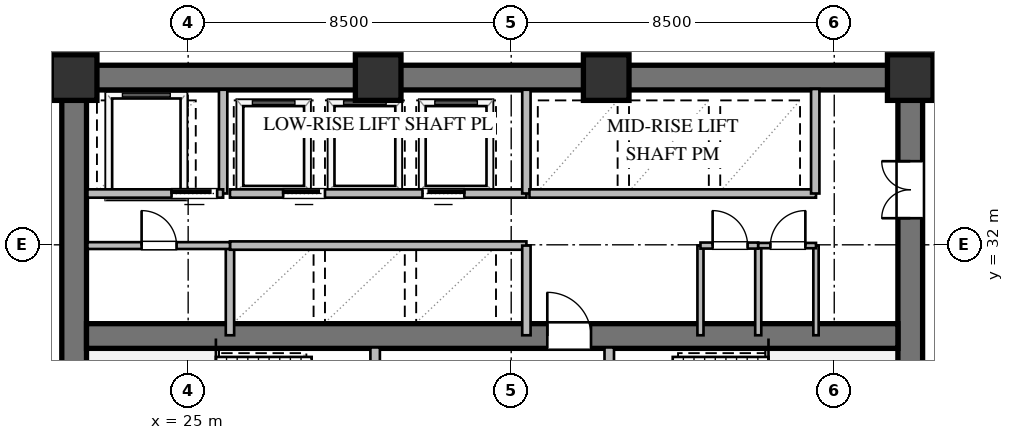
"""IFC4 building model, lengths in metres.
Left out: names, types, materials, properties, quantities, classifications, styles, units other than length and angle.
Written with IfcOpenShell. Run it as: python <this file> out.ifc"""

import sys

from ifc_helpers import new_model, si_unit, direction, frame, frame_2d, origin, origin_2d, place, context, subcontext, project, spatial, rectangle, extrude, element, fill, save


model = new_model("IFC4")
c1 = context("Model", 3, precision=1e-05, world=origin(), true_north=direction((0.0, 1.0)))
c2 = subcontext(c1, "Body", "Model", "MODEL_VIEW")
j1 = project(units=[si_unit("LENGTHUNIT", "METRE"), si_unit("PLANEANGLEUNIT", "RADIAN")], contexts=[c1])
p1 = place(None, origin())
s1 = spatial("IfcSite", under=j1, at=p1, CompositionType="ELEMENT")
p2 = place(p1, origin())
s2 = spatial("IfcBuilding", under=s1, at=p2, CompositionType="ELEMENT")
p3 = place(p2, frame((0.0, 0.0, 74.4)))
s3 = spatial("IfcBuildingStorey", under=s2, at=p3, CompositionType="ELEMENT", Elevation=74.4)
p4 = place(p3, frame((21.675, 36.4, 0.0), z_axis=(0.0, 0.0, 1.0), x_axis=(1.0, 0.0, 0.0)))
e1 = element("IfcWall", 1, at=p4, inside=s3, PredefinedType="SHEAR", context=c2, shape_type="SweptSolid", body=[
    extrude(rectangle(XDim=22.65, YDim=0.65, at=frame_2d((11.325, 0.0))), origin(), (0.0, 0.0, 1.0), 3.36),
])
p5 = place(p3, frame((22.0, 23.925, 0.0), z_axis=(0.0, 0.0, 1.0), x_axis=(0.0, 1.0, 0.0)))
e2 = element("IfcWall", 2, at=p5, inside=s3, PredefinedType="SHEAR", context=c2, shape_type="SweptSolid", body=[
    extrude(rectangle(XDim=12.15, YDim=0.65, at=frame_2d((6.075, 0.0))), origin(), (0.0, 0.0, 1.0), 3.36),
])
p6 = place(p3, frame((44.0, 23.925, 0.0), z_axis=(0.0, 0.0, 1.0), x_axis=(0.0, 1.0, 0.0)))
e3 = element("IfcWall", 3, at=p6, inside=s3, PredefinedType="SHEAR", context=c2, shape_type="SweptSolid", body=[
    extrude(rectangle(XDim=12.15, YDim=0.65, at=frame_2d((6.075, 0.0))), origin(), (0.0, 0.0, 1.0), 3.36),
])
p7 = place(p6, frame((8.775, 0.0, 0.0)))
e4 = element("IfcOpeningElement", 4, at=p7, cuts=e3, PredefinedType="OPENING", context=c2, shape_type="SweptSolid", body=[
    extrude(rectangle(XDim=1.5, YDim=2.15, at=frame_2d((0.75, 1.075))), frame((0.0, 0.335, 0.0), z_axis=(0.0, -1.0, 0.0), x_axis=(1.0, 0.0, 0.0)), (0.0, 0.0, 1.0), 0.67),
])
p8 = place(p3, frame((22.325, 29.6, 0.0), z_axis=(0.0, 0.0, 1.0), x_axis=(1.0, 0.0, 0.0)))
e5 = element("IfcWall", 5, at=p8, inside=s3, PredefinedType="SHEAR", context=c2, shape_type="SweptSolid", body=[
    extrude(rectangle(XDim=21.35, YDim=0.65, at=frame_2d((10.675, 0.0))), origin(), (0.0, 0.0, 1.0), 3.36),
])
p9 = place(p8, frame((12.125, 0.0, 0.0)))
e6 = element("IfcOpeningElement", 6, at=p9, cuts=e5, PredefinedType="OPENING", context=c2, shape_type="SweptSolid", body=[
    extrude(rectangle(XDim=1.15, YDim=2.1, at=frame_2d((0.575, 1.05))), frame((0.0, 0.335, 0.0), z_axis=(0.0, -1.0, 0.0), x_axis=(1.0, 0.0, 0.0)), (0.0, 0.0, 1.0), 0.67),
])
for number, where, z_axis, x_axis in (
    (7, (44.0, 36.4, 0.0), (0.0, 0.0, 1.0), (1.0, 0.0, 0.0)),
    (8, (36.0, 36.4, 0.0), (0.0, 0.0, 1.0), (1.0, 0.0, 0.0)),
    (9, (30.0, 36.4, 0.0), (0.0, 0.0, 1.0), (1.0, 0.0, 0.0)),
    (10, (22.0, 36.4, 0.0), (0.0, 0.0, 1.0), (1.0, 0.0, 0.0)),
):
    element("IfcColumn", number, at=place(p3, frame(where, z_axis=z_axis, x_axis=x_axis)), inside=s3, PredefinedType="COLUMN", context=c2, shape_type="SweptSolid", body=[
        extrude(rectangle(XDim=1.2, YDim=1.2, at=origin_2d()), origin(), (0.0, 0.0, 1.0), 3.6),
    ])
p10 = place(p3, frame((29.92, 23.9, 0.0), z_axis=(0.0, 0.0, 1.0), x_axis=(0.0, 1.0, 0.0)))
e11 = element("IfcWall", 11, at=p10, inside=s3, PredefinedType="SOLIDWALL", context=c2, shape_type="SweptSolid", body=[
    extrude(rectangle(XDim=5.4, YDim=0.25, at=frame_2d((2.7, 0.0))), origin(), (0.0, 0.0, 1.0), 3.36),
])
p11 = place(p10, frame((3.421, 0.0, 0.0)))
e12 = element("IfcOpeningElement", 12, at=p11, cuts=e11, PredefinedType="OPENING", context=c2, shape_type="SweptSolid", body=[
    extrude(rectangle(XDim=1.15, YDim=2.1, at=frame_2d((0.575, 1.05))), frame((0.0, 0.135, 0.0), z_axis=(0.0, -1.0, 0.0), x_axis=(1.0, 0.0, 0.0)), (0.0, 0.0, 1.0), 0.27),
])
p12 = place(p3, frame((36.08, 23.9, 0.0), z_axis=(0.0, 0.0, 1.0), x_axis=(0.0, 1.0, 0.0)))
e13 = element("IfcWall", 13, at=p12, inside=s3, PredefinedType="SOLIDWALL", context=c2, shape_type="SweptSolid", body=[
    extrude(rectangle(XDim=5.4, YDim=0.25, at=frame_2d((2.7, 0.0))), origin(), (0.0, 0.0, 1.0), 3.36),
])
p13 = place(p12, frame((3.421, 0.0, 0.0)))
e14 = element("IfcOpeningElement", 14, at=p13, cuts=e13, PredefinedType="OPENING", context=c2, shape_type="SweptSolid", body=[
    extrude(rectangle(XDim=1.15, YDim=2.1, at=frame_2d((0.575, 1.05))), frame((0.0, 0.135, 0.0), z_axis=(0.0, -1.0, 0.0), x_axis=(1.0, 0.0, 0.0)), (0.0, 0.0, 1.0), 0.27),
])
p14 = place(p3, frame((25.92, 33.35, 0.0), z_axis=(0.0, 0.0, 1.0), x_axis=(0.0, 1.0, 0.0)))
e15 = element("IfcWall", 15, at=p14, inside=s3, PredefinedType="SOLIDWALL", context=c2, shape_type="SweptSolid", body=[
    extrude(rectangle(XDim=2.73, YDim=0.22, at=frame_2d((1.365, 0.0))), origin(), (0.0, 0.0, 1.0), 3.36),
])
p15 = place(p3, frame((22.35, 33.35, 0.0), z_axis=(0.0, 0.0, 1.0), x_axis=(1.0, 0.0, 0.0)))
e16 = element("IfcWall", 16, at=p15, inside=s3, PredefinedType="SOLIDWALL", context=c2, shape_type="SweptSolid", body=[
    extrude(rectangle(XDim=3.57, YDim=0.22, at=frame_2d((1.785, 0.0))), origin(), (0.0, 0.0, 1.0), 3.36),
])
p16 = place(p15, frame((2.213, 0.0, 0.0)))
e17 = element("IfcOpeningElement", 17, at=p16, cuts=e16, PredefinedType="OPENING", context=c2, shape_type="SweptSolid", body=[
    extrude(rectangle(XDim=1.2, YDim=2.1, at=frame_2d((0.6, 1.05))), frame((0.0, 0.12, 0.0), z_axis=(0.0, -1.0, 0.0), x_axis=(1.0, 0.0, 0.0)), (0.0, 0.0, 1.0), 0.24),
])
p17 = place(p3, frame((26.1, 29.62, 0.0), z_axis=(0.0, 0.0, 1.0), x_axis=(0.0, 1.0, 0.0)))
e18 = element("IfcWall", 18, at=p17, inside=s3, PredefinedType="SOLIDWALL", context=c2, shape_type="SweptSolid", body=[
    extrude(rectangle(XDim=2.36, YDim=0.22, at=frame_2d((1.18, 0.0))), origin(), (0.0, 0.0, 1.0), 3.36),
])
p18 = place(p3, frame((26.1, 31.98, 0.0), z_axis=(0.0, 0.0, 1.0), x_axis=(1.0, 0.0, 0.0)))
e19 = element("IfcWall", 19, at=p18, inside=s3, PredefinedType="SOLIDWALL", context=c2, shape_type="SweptSolid", body=[
    extrude(rectangle(XDim=7.8, YDim=0.22, at=frame_2d((3.9, 0.0))), origin(), (0.0, 0.0, 1.0), 3.36),
])
p19 = place(p3, frame((33.9, 29.62, 0.0), z_axis=(0.0, 0.0, 1.0), x_axis=(0.0, 1.0, 0.0)))
e20 = element("IfcWall", 20, at=p19, inside=s3, PredefinedType="SOLIDWALL", context=c2, shape_type="SweptSolid", body=[
    extrude(rectangle(XDim=2.36, YDim=0.22, at=frame_2d((1.18, 0.0))), origin(), (0.0, 0.0, 1.0), 3.36),
])
p20 = place(p3, frame((26.1, 33.35, 0.0), z_axis=(0.0, 0.0, 1.0), x_axis=(1.0, 0.0, 0.0)))
e21 = element("IfcWall", 21, at=p20, inside=s3, PredefinedType="SOLIDWALL", context=c2, shape_type="SweptSolid", body=[
    extrude(rectangle(XDim=7.8, YDim=0.22, at=frame_2d((3.9, 0.0))), origin(), (0.0, 0.0, 1.0), 3.36),
])
p21 = place(p20, frame((1.4, 0.0, 0.0)))
e22 = element("IfcOpeningElement", 22, at=p21, cuts=e21, PredefinedType="OPENING", context=c2, shape_type="SweptSolid", body=[
    extrude(rectangle(XDim=1.1, YDim=2.1, at=frame_2d((0.55, 1.05))), frame((0.0, 0.12, 0.0), z_axis=(0.0, -1.0, 0.0), x_axis=(1.0, 0.0, 0.0)), (0.0, 0.0, 1.0), 0.24),
])
p22 = place(p20, frame((5.066, 0.0, 0.0)))
e23 = element("IfcOpeningElement", 23, at=p22, cuts=e21, PredefinedType="OPENING", context=c2, shape_type="SweptSolid", body=[
    extrude(rectangle(XDim=1.1, YDim=2.1, at=frame_2d((0.55, 1.05))), frame((0.0, 0.12, 0.0), z_axis=(0.0, -1.0, 0.0), x_axis=(1.0, 0.0, 0.0)), (0.0, 0.0, 1.0), 0.24),
])
p23 = place(p3, frame((33.9, 33.35, 0.0), z_axis=(0.0, 0.0, 1.0), x_axis=(0.0, 1.0, 0.0)))
e24 = element("IfcWall", 24, at=p23, inside=s3, PredefinedType="SOLIDWALL", context=c2, shape_type="SweptSolid", body=[
    extrude(rectangle(XDim=2.73, YDim=0.22, at=frame_2d((1.365, 0.0))), origin(), (0.0, 0.0, 1.0), 3.36),
])
p24 = place(p3, frame((33.98, 33.35, 0.0), z_axis=(0.0, 0.0, 1.0), x_axis=(1.0, 0.0, 0.0)))
e25 = element("IfcWall", 25, at=p24, inside=s3, PredefinedType="SOLIDWALL", context=c2, shape_type="SweptSolid", body=[
    extrude(rectangle(XDim=7.54, YDim=0.22, at=frame_2d((3.77, 0.0))), origin(), (0.0, 0.0, 1.0), 3.36),
])
p25 = place(p3, frame((41.5, 33.35, 0.0), z_axis=(0.0, 0.0, 1.0), x_axis=(0.0, 1.0, 0.0)))
e26 = element("IfcWall", 26, at=p25, inside=s3, PredefinedType="SOLIDWALL", context=c2, shape_type="SweptSolid", body=[
    extrude(rectangle(XDim=2.75, YDim=0.22, at=frame_2d((1.375, 0.0))), origin(), (0.0, 0.0, 1.0), 3.36),
])
p26 = place(p3, frame((22.35, 31.98, 0.0), z_axis=(0.0, 0.0, 1.0), x_axis=(1.0, 0.0, 0.0)))
e27 = element("IfcWall", 27, at=p26, inside=s3, PredefinedType="PARTITIONING", context=c2, shape_type="SweptSolid", body=[
    extrude(rectangle(XDim=3.75, YDim=0.18, at=frame_2d((1.875, 0.0))), origin(), (0.0, 0.0, 1.0), 3.36),
])
p27 = place(p26, frame((1.425, 0.0, 0.0)))
e28 = element("IfcOpeningElement", 28, at=p27, cuts=e27, PredefinedType="OPENING", context=c2, shape_type="SweptSolid", body=[
    extrude(rectangle(XDim=0.92, YDim=2.1, at=frame_2d((0.46, 1.05))), frame((0.0, 0.1, 0.0), z_axis=(0.0, -1.0, 0.0), x_axis=(1.0, 0.0, 0.0)), (0.0, 0.0, 1.0), 0.2),
])
for number, where, z_axis, x_axis in (
    (29, (38.48, 29.62, 0.0), (0.0, 0.0, 1.0), (0.0, 1.0, 0.0)),
    (30, (40.0, 29.62, 0.0), (0.0, 0.0, 1.0), (0.0, 1.0, 0.0)),
):
    element("IfcWall", number, at=place(p3, frame(where, z_axis=z_axis, x_axis=x_axis)), inside=s3, PredefinedType="PLUMBINGWALL", context=c2, shape_type="SweptSolid", body=[
        extrude(rectangle(XDim=2.36, YDim=0.16, at=frame_2d((1.18, 0.0))), origin(), (0.0, 0.0, 1.0), 3.36),
    ])
p28 = place(p3, frame((41.52, 29.62, 0.0), z_axis=(0.0, 0.0, 1.0), x_axis=(0.0, 1.0, 0.0)))
e31 = element("IfcWall", 31, at=p28, inside=s3, PredefinedType="PARTITIONING", context=c2, shape_type="SweptSolid", body=[
    extrude(rectangle(XDim=2.36, YDim=0.14, at=frame_2d((1.18, 0.0))), origin(), (0.0, 0.0, 1.0), 3.36),
])
p29 = place(p3, frame((38.48, 31.98, 0.0), z_axis=(0.0, 0.0, 1.0), x_axis=(1.0, 0.0, 0.0)))
e32 = element("IfcWall", 32, at=p29, inside=s3, PredefinedType="PLUMBINGWALL", context=c2, shape_type="SweptSolid", body=[
    extrude(rectangle(XDim=1.52, YDim=0.16, at=frame_2d((0.76, 0.0))), origin(), (0.0, 0.0, 1.0), 3.36),
])
p30 = place(p29, frame((0.32, 0.0, 0.0)))
e33 = element("IfcOpeningElement", 33, at=p30, cuts=e32, PredefinedType="OPENING", context=c2, shape_type="SweptSolid", body=[
    extrude(rectangle(XDim=0.92, YDim=2.1, at=frame_2d((0.46, 1.05))), frame((0.0, 0.09, 0.0), z_axis=(0.0, -1.0, 0.0), x_axis=(1.0, 0.0, 0.0)), (0.0, 0.0, 1.0), 0.18),
])
p31 = place(p3, frame((40.0, 31.98, 0.0), z_axis=(0.0, 0.0, 1.0), x_axis=(1.0, 0.0, 0.0)))
e34 = element("IfcWall", 34, at=p31, inside=s3, PredefinedType="PARTITIONING", context=c2, shape_type="SweptSolid", body=[
    extrude(rectangle(XDim=1.52, YDim=0.14, at=frame_2d((0.76, 0.0))), origin(), (0.0, 0.0, 1.0), 3.36),
])
p32 = place(p31, frame((0.32, 0.0, 0.0)))
e35 = element("IfcOpeningElement", 35, at=p32, cuts=e34, PredefinedType="OPENING", context=c2, shape_type="SweptSolid", body=[
    extrude(rectangle(XDim=0.92, YDim=2.1, at=frame_2d((0.46, 1.05))), frame((0.0, 0.08, 0.0), z_axis=(0.0, -1.0, 0.0), x_axis=(1.0, 0.0, 0.0)), (0.0, 0.0, 1.0), 0.16),
])
p33 = place(p9, origin())
e36 = element("IfcDoor", 36, at=p33, inside=s3, OperationType="SINGLE_SWING_LEFT", PredefinedType="DOOR", context=c2, shape_type="SweptSolid", body=[
    extrude(rectangle(XDim=1.15, YDim=2.1, at=frame_2d((0.575, 1.05))), frame((0.0, 0.025, 0.0), z_axis=(0.0, -1.0, 0.0), x_axis=(1.0, 0.0, 0.0)), (0.0, 0.0, 1.0), 0.05),
])
fill(e6, e36)
p34 = place(p7, origin())
e37 = element("IfcDoor", 37, at=p34, inside=s3, OperationType="DOUBLE_DOOR_SINGLE_SWING", PredefinedType="DOOR", context=c2, shape_type="SweptSolid", body=[
    extrude(rectangle(XDim=1.5, YDim=2.15, at=frame_2d((0.75, 1.075))), frame((0.0, 0.025, 0.0), z_axis=(0.0, -1.0, 0.0), x_axis=(1.0, 0.0, 0.0)), (0.0, 0.0, 1.0), 0.05),
])
fill(e4, e37)
p35 = place(p16, origin())
e38 = element("IfcDoor", 38, at=p35, inside=s3, OperationType="SLIDING_TO_LEFT", PredefinedType="DOOR", context=c2, shape_type="SweptSolid", body=[
    extrude(rectangle(XDim=1.2, YDim=2.1, at=frame_2d((0.6, 1.05))), frame((0.0, 0.025, 0.0), z_axis=(0.0, -1.0, 0.0), x_axis=(1.0, 0.0, 0.0)), (0.0, 0.0, 1.0), 0.05),
])
fill(e17, e38)
p36 = place(p21, origin())
e39 = element("IfcDoor", 39, at=p36, inside=s3, OperationType="SLIDING_TO_LEFT", PredefinedType="DOOR", context=c2, shape_type="SweptSolid", body=[
    extrude(rectangle(XDim=1.1, YDim=2.1, at=frame_2d((0.55, 1.05))), frame((0.0, 0.025, 0.0), z_axis=(0.0, -1.0, 0.0), x_axis=(1.0, 0.0, 0.0)), (0.0, 0.0, 1.0), 0.05),
])
fill(e22, e39)
p37 = place(p22, origin())
e40 = element("IfcDoor", 40, at=p37, inside=s3, OperationType="SLIDING_TO_RIGHT", PredefinedType="DOOR", context=c2, shape_type="SweptSolid", body=[
    extrude(rectangle(XDim=1.1, YDim=2.1, at=frame_2d((0.55, 1.05))), frame((0.0, 0.025, 0.0), z_axis=(0.0, -1.0, 0.0), x_axis=(1.0, 0.0, 0.0)), (0.0, 0.0, 1.0), 0.05),
])
fill(e23, e40)
p38 = place(p27, origin())
e41 = element("IfcDoor", 41, at=p38, inside=s3, OperationType="SINGLE_SWING_LEFT", PredefinedType="DOOR", context=c2, shape_type="SweptSolid", body=[
    extrude(rectangle(XDim=0.92, YDim=2.1, at=frame_2d((0.46, 1.05))), frame((0.0, 0.025, 0.0), z_axis=(0.0, -1.0, 0.0), x_axis=(1.0, 0.0, 0.0)), (0.0, 0.0, 1.0), 0.05),
])
fill(e28, e41)
p39 = place(p30, origin())
e42 = element("IfcDoor", 42, at=p39, inside=s3, OperationType="SINGLE_SWING_LEFT", PredefinedType="DOOR", context=c2, shape_type="SweptSolid", body=[
    extrude(rectangle(XDim=0.92, YDim=2.1, at=frame_2d((0.46, 1.05))), frame((0.0, 0.025, 0.0), z_axis=(0.0, -1.0, 0.0), x_axis=(1.0, 0.0, 0.0)), (0.0, 0.0, 1.0), 0.05),
])
fill(e33, e42)
p40 = place(p32, origin())
e43 = element("IfcDoor", 43, at=p40, inside=s3, OperationType="SINGLE_SWING_RIGHT", PredefinedType="DOOR", context=c2, shape_type="SweptSolid", body=[
    extrude(rectangle(XDim=0.92, YDim=2.1, at=frame_2d((0.46, 1.05))), frame((0.0, 0.025, 0.0), z_axis=(0.0, -1.0, 0.0), x_axis=(1.0, 0.0, 0.0)), (0.0, 0.0, 1.0), 0.05),
])
fill(e35, e43)
save(model, sys.argv[1])
